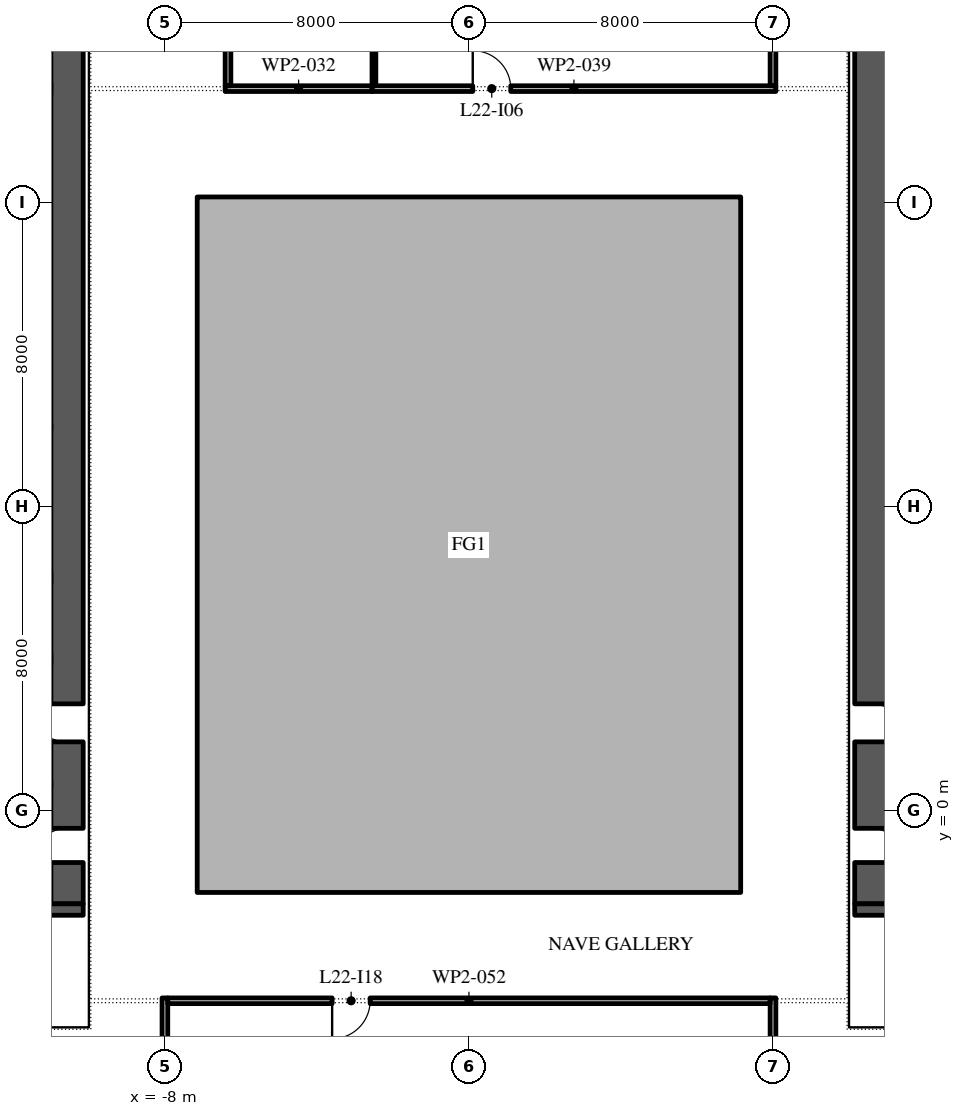
"""IFC4 building model, lengths in metres.
Left out: names, types, materials, properties, quantities, classifications, styles, units other than length and angle.
Written with IfcOpenShell. Run it as: python <this file> out.ifc"""

import sys

from ifc_helpers import new_model, si_unit, direction, frame, frame_2d, origin, place, context, subcontext, project, spatial, polyline, rectangle, outline, extrude, element, fill, save


model = new_model("IFC4")
c1 = context("Model", 3, precision=1e-05, world=origin(), true_north=direction((0.0, 1.0)))
c2 = subcontext(c1, "Body", "Model", "MODEL_VIEW")
j1 = project(units=[si_unit("LENGTHUNIT", "METRE"), si_unit("PLANEANGLEUNIT", "RADIAN")], contexts=[c1])
p1 = place(None, origin())
s1 = spatial("IfcSite", under=j1, at=p1, CompositionType="ELEMENT")
p2 = place(p1, origin())
s2 = spatial("IfcBuilding", under=s1, at=p2, CompositionType="ELEMENT")
p3 = place(p2, frame((0.0, 0.0, 105.6)))
s3 = spatial("IfcBuildingStorey", under=s2, at=p3, CompositionType="ELEMENT", Elevation=105.6)
p4 = place(p3, origin())
e1 = element("IfcWall", 1, at=p4, inside=s3, PredefinedType="STANDARD", context=c2, shape_type="SweptSolid", body=[
    extrude(outline(polyline([(-7.15, -2.15), (7.15, -2.15), (7.15, 16.15), (-7.15, 16.15), (-7.15, -2.15)]), holes=[polyline([(-7.0, -2.0), (-7.0, 16.0), (7.0, 16.0), (7.0, -2.0), (-7.0, -2.0)])]), origin(), (0.0, 0.0, 1.0), 4.0),
])
p5 = place(p3, frame((-10.575, -2.45, 0.0), z_axis=(0.0, 0.0, 1.0), x_axis=(0.0, 1.0, 0.0)))
e2 = element("IfcWall", 2, at=p5, inside=s3, PredefinedType="SHEAR", context=c2, shape_type="SweptSolid", body=[
    extrude(rectangle(XDim=27.9, YDim=0.85, at=frame_2d((13.95, 0.0))), origin(), (0.0, 0.0, 1.0), 4.0),
])
p6 = place(p5, frame((23.65, 0.0, 0.0)))
e3 = element("IfcOpeningElement", 3, at=p6, cuts=e2, PredefinedType="OPENING", context=c2, shape_type="SweptSolid", body=[
    extrude(rectangle(XDim=2.4, YDim=2.1, at=frame_2d((1.2, 1.05))), frame((0.0, 0.435, 0.0), z_axis=(0.0, -1.0, 0.0), x_axis=(1.0, 0.0, 0.0)), (0.0, 0.0, 1.0), 0.87),
])
p7 = place(p5, frame((1.087, 0.0, 0.0)))
e4 = element("IfcOpeningElement", 4, at=p7, cuts=e2, PredefinedType="OPENING", context=c2, shape_type="SweptSolid", body=[
    extrude(rectangle(XDim=0.9, YDim=2.1, at=frame_2d((0.45, 1.05))), frame((0.0, 0.435, 0.0), z_axis=(0.0, -1.0, 0.0), x_axis=(1.0, 0.0, 0.0)), (0.0, 0.0, 1.0), 0.87),
])
p8 = place(p5, frame((4.262, 0.0, 0.0)))
e5 = element("IfcOpeningElement", 5, at=p8, cuts=e2, PredefinedType="OPENING", context=c2, shape_type="SweptSolid", body=[
    extrude(rectangle(XDim=1.0, YDim=2.1, at=frame_2d((0.5, 1.05))), frame((0.0, 0.435, 0.0), z_axis=(0.0, -1.0, 0.0), x_axis=(1.0, 0.0, 0.0)), (0.0, 0.0, 1.0), 0.87),
])
p9 = place(p3, frame((-21.85, -2.6, 0.0), z_axis=(0.0, 0.0, 1.0), x_axis=(1.0, 0.0, 0.0)))
e6 = element("IfcWall", 6, at=p9, inside=s3, PredefinedType="SHEAR", context=c2, shape_type="SweptSolid", body=[
    extrude(rectangle(XDim=11.7, YDim=0.3, at=frame_2d((5.85, 0.0))), origin(), (0.0, 0.0, 1.0), 4.0),
])
p10 = place(p3, frame((10.575, -2.45, 0.0), z_axis=(0.0, 0.0, 1.0), x_axis=(0.0, 1.0, 0.0)))
e7 = element("IfcWall", 7, at=p10, inside=s3, PredefinedType="SHEAR", context=c2, shape_type="SweptSolid", body=[
    extrude(rectangle(XDim=27.9, YDim=0.85, at=frame_2d((13.95, 0.0))), origin(), (0.0, 0.0, 1.0), 4.0),
])
p11 = place(p10, frame((23.65, 0.0, 0.0)))
e8 = element("IfcOpeningElement", 8, at=p11, cuts=e7, PredefinedType="OPENING", context=c2, shape_type="SweptSolid", body=[
    extrude(rectangle(XDim=2.4, YDim=2.1, at=frame_2d((1.2, 1.05))), frame((0.0, 0.435, 0.0), z_axis=(0.0, -1.0, 0.0), x_axis=(1.0, 0.0, 0.0)), (0.0, 0.0, 1.0), 0.87),
])
p12 = place(p10, frame((1.087, 0.0, 0.0)))
e9 = element("IfcOpeningElement", 9, at=p12, cuts=e7, PredefinedType="OPENING", context=c2, shape_type="SweptSolid", body=[
    extrude(rectangle(XDim=0.9, YDim=2.1, at=frame_2d((0.45, 1.05))), frame((0.0, 0.435, 0.0), z_axis=(0.0, -1.0, 0.0), x_axis=(1.0, 0.0, 0.0)), (0.0, 0.0, 1.0), 0.87),
])
p13 = place(p10, frame((4.262, 0.0, 0.0)))
e10 = element("IfcOpeningElement", 10, at=p13, cuts=e7, PredefinedType="OPENING", context=c2, shape_type="SweptSolid", body=[
    extrude(rectangle(XDim=1.0, YDim=2.1, at=frame_2d((0.5, 1.05))), frame((0.0, 0.435, 0.0), z_axis=(0.0, -1.0, 0.0), x_axis=(1.0, 0.0, 0.0)), (0.0, 0.0, 1.0), 0.87),
])
p14 = place(p3, frame((10.15, -2.6, 0.0), z_axis=(0.0, 0.0, 1.0), x_axis=(1.0, 0.0, 0.0)))
e11 = element("IfcWall", 11, at=p14, inside=s3, PredefinedType="SHEAR", context=c2, shape_type="SweptSolid", body=[
    extrude(rectangle(XDim=11.7, YDim=0.3, at=frame_2d((5.85, 0.0))), origin(), (0.0, 0.0, 1.0), 4.0),
])
p15 = place(p3, frame((-8.0, -4.925, 0.0), z_axis=(0.0, 0.0, 1.0), x_axis=(0.0, -1.0, 0.0)))
e12 = element("IfcWall", 12, at=p15, inside=s3, PredefinedType="PARTITIONING", context=c2, shape_type="SweptSolid", body=[
    extrude(rectangle(XDim=2.7, YDim=0.15, at=frame_2d((1.35, 0.0))), origin(), (0.0, 0.0, 1.0), 4.0),
])
p16 = place(p3, frame((-6.415, 19.0, 0.0), z_axis=(0.0, 0.0, 1.0), x_axis=(1.0, 0.0, 0.0)))
e13 = element("IfcWall", 13, at=p16, inside=s3, PredefinedType="PARTITIONING", context=c2, shape_type="SweptSolid", body=[
    extrude(rectangle(XDim=3.865, YDim=0.15, at=frame_2d((1.933, 0.0))), origin(), (0.0, 0.0, 1.0), 4.0),
])
p17 = place(p3, frame((-6.34, 25.05, 0.0), z_axis=(0.0, 0.0, 1.0), x_axis=(0.0, -1.0, 0.0)))
e14 = element("IfcWall", 14, at=p17, inside=s3, PredefinedType="PARTITIONING", context=c2, shape_type="SweptSolid", body=[
    extrude(rectangle(XDim=5.975, YDim=0.15, at=frame_2d((2.988, 0.0))), origin(), (0.0, 0.0, 1.0), 4.0),
])
p18 = place(p17, frame((2.65, 0.0, 0.0)))
e15 = element("IfcOpeningElement", 15, at=p18, cuts=e14, PredefinedType="OPENING", context=c2, shape_type="SweptSolid", body=[
    extrude(rectangle(XDim=1.0, YDim=2.1, at=frame_2d((0.5, 1.05))), frame((0.0, 0.085, 0.0), z_axis=(0.0, -1.0, 0.0), x_axis=(1.0, 0.0, 0.0)), (0.0, 0.0, 1.0), 0.17),
])
p19 = place(p3, frame((-2.55, 19.0, 0.0), z_axis=(0.0, 0.0, 1.0), x_axis=(1.0, 0.0, 0.0)))
e16 = element("IfcWall", 16, at=p19, inside=s3, PredefinedType="PARTITIONING", context=c2, shape_type="SweptSolid", body=[
    extrude(rectangle(XDim=10.625, YDim=0.15, at=frame_2d((5.312, 0.0))), origin(), (0.0, 0.0, 1.0), 4.0),
])
p20 = place(p19, frame((2.65, 0.0, 0.0)))
e17 = element("IfcOpeningElement", 17, at=p20, cuts=e16, PredefinedType="OPENING", context=c2, shape_type="SweptSolid", body=[
    extrude(rectangle(XDim=1.0, YDim=2.1, at=frame_2d((0.5, 1.05))), frame((0.0, 0.085, 0.0), z_axis=(0.0, -1.0, 0.0), x_axis=(1.0, 0.0, 0.0)), (0.0, 0.0, 1.0), 0.17),
])
p21 = place(p3, frame((-2.5, 24.95, 0.0), z_axis=(0.0, 0.0, 1.0), x_axis=(0.0, -1.0, 0.0)))
e18 = element("IfcWall", 18, at=p21, inside=s3, PredefinedType="PARTITIONING", context=c2, shape_type="SweptSolid", body=[
    extrude(rectangle(XDim=5.875, YDim=0.1, at=frame_2d((2.938, 0.0))), origin(), (0.0, 0.0, 1.0), 4.0),
])
p22 = place(p3, frame((8.0, -7.775, 0.0), z_axis=(0.0, 0.0, 1.0), x_axis=(0.0, 1.0, 0.0)))
e19 = element("IfcWall", 19, at=p22, inside=s3, PredefinedType="PARTITIONING", context=c2, shape_type="SweptSolid", body=[
    extrude(rectangle(XDim=2.85, YDim=0.15, at=frame_2d((1.425, 0.0))), origin(), (0.0, 0.0, 1.0), 4.0),
])
p23 = place(p3, frame((7.925, -5.0, 0.0), z_axis=(0.0, 0.0, 1.0), x_axis=(-1.0, 0.0, 0.0)))
e20 = element("IfcWall", 20, at=p23, inside=s3, PredefinedType="PARTITIONING", context=c2, shape_type="SweptSolid", body=[
    extrude(rectangle(XDim=15.85, YDim=0.15, at=frame_2d((7.925, 0.0))), origin(), (0.0, 0.0, 1.0), 4.0),
])
p24 = place(p23, frame((10.525, 0.0, 0.0)))
e21 = element("IfcOpeningElement", 21, at=p24, cuts=e20, PredefinedType="OPENING", context=c2, shape_type="SweptSolid", body=[
    extrude(rectangle(XDim=1.0, YDim=2.1, at=frame_2d((0.5, 1.05))), frame((0.0, 0.085, 0.0), z_axis=(0.0, -1.0, 0.0), x_axis=(1.0, 0.0, 0.0)), (0.0, 0.0, 1.0), 0.17),
])
p25 = place(p3, frame((8.0, 19.075, 0.0), z_axis=(0.0, 0.0, 1.0), x_axis=(0.0, 1.0, 0.0)))
e22 = element("IfcWall", 22, at=p25, inside=s3, PredefinedType="PARTITIONING", context=c2, shape_type="SweptSolid", body=[
    extrude(rectangle(XDim=5.875, YDim=0.15, at=frame_2d((2.938, 0.0))), origin(), (0.0, 0.0, 1.0), 4.0),
])
p26 = place(p7, origin())
e23 = element("IfcDoor", 23, at=p26, inside=s3, OperationType="SINGLE_SWING_RIGHT", PredefinedType="DOOR", context=c2, shape_type="SweptSolid", body=[
    extrude(rectangle(XDim=0.9, YDim=2.1, at=frame_2d((0.45, 1.05))), frame((0.0, 0.425, 0.0), z_axis=(0.0, -1.0, 0.0), x_axis=(1.0, 0.0, 0.0)), (0.0, 0.0, 1.0), 0.05),
])
fill(e4, e23)
p27 = place(p8, origin())
e24 = element("IfcDoor", 24, at=p27, inside=s3, OperationType="SINGLE_SWING_LEFT", PredefinedType="DOOR", context=c2, shape_type="SweptSolid", body=[
    extrude(rectangle(XDim=1.0, YDim=2.1, at=frame_2d((0.5, 1.05))), frame((0.0, 0.425, 0.0), z_axis=(0.0, -1.0, 0.0), x_axis=(1.0, 0.0, 0.0)), (0.0, 0.0, 1.0), 0.05),
])
fill(e5, e24)
p28 = place(p12, frame((0.9, -0.8, 0.0), z_axis=(0.0, 0.0, 1.0), x_axis=(-1.0, 0.0, 0.0)))
e25 = element("IfcDoor", 25, at=p28, inside=s3, OperationType="SINGLE_SWING_LEFT", PredefinedType="DOOR", context=c2, shape_type="SweptSolid", body=[
    extrude(rectangle(XDim=0.9, YDim=2.1, at=frame_2d((0.45, 1.05))), frame((0.0, -0.375, 0.0), z_axis=(0.0, -1.0, 0.0), x_axis=(1.0, 0.0, 0.0)), (0.0, 0.0, 1.0), 0.05),
])
fill(e9, e25)
p29 = place(p13, frame((1.0, -0.8, 0.0), z_axis=(0.0, 0.0, 1.0), x_axis=(-1.0, 0.0, 0.0)))
e26 = element("IfcDoor", 26, at=p29, inside=s3, OperationType="SINGLE_SWING_LEFT", PredefinedType="DOOR", context=c2, shape_type="SweptSolid", body=[
    extrude(rectangle(XDim=1.0, YDim=2.1, at=frame_2d((0.5, 1.05))), frame((0.0, -0.375, 0.0), z_axis=(0.0, -1.0, 0.0), x_axis=(1.0, 0.0, 0.0)), (0.0, 0.0, 1.0), 0.05),
])
fill(e10, e26)
p30 = place(p20, origin())
e27 = element("IfcDoor", 27, at=p30, inside=s3, OperationType="SINGLE_SWING_RIGHT", PredefinedType="DOOR", context=c2, shape_type="SweptSolid", body=[
    extrude(rectangle(XDim=1.0, YDim=2.1, at=frame_2d((0.5, 1.05))), frame((0.0, 0.025, 0.0), z_axis=(0.0, -1.0, 0.0), x_axis=(1.0, 0.0, 0.0)), (0.0, 0.0, 1.0), 0.05),
])
fill(e17, e27)
p31 = place(p24, origin())
e28 = element("IfcDoor", 28, at=p31, inside=s3, OperationType="SINGLE_SWING_LEFT", PredefinedType="DOOR", context=c2, shape_type="SweptSolid", body=[
    extrude(rectangle(XDim=1.0, YDim=2.1, at=frame_2d((0.5, 1.05))), frame((0.0, 0.025, 0.0), z_axis=(0.0, -1.0, 0.0), x_axis=(1.0, 0.0, 0.0)), (0.0, 0.0, 1.0), 0.05),
])
fill(e21, e28)
save(model, sys.argv[1])
